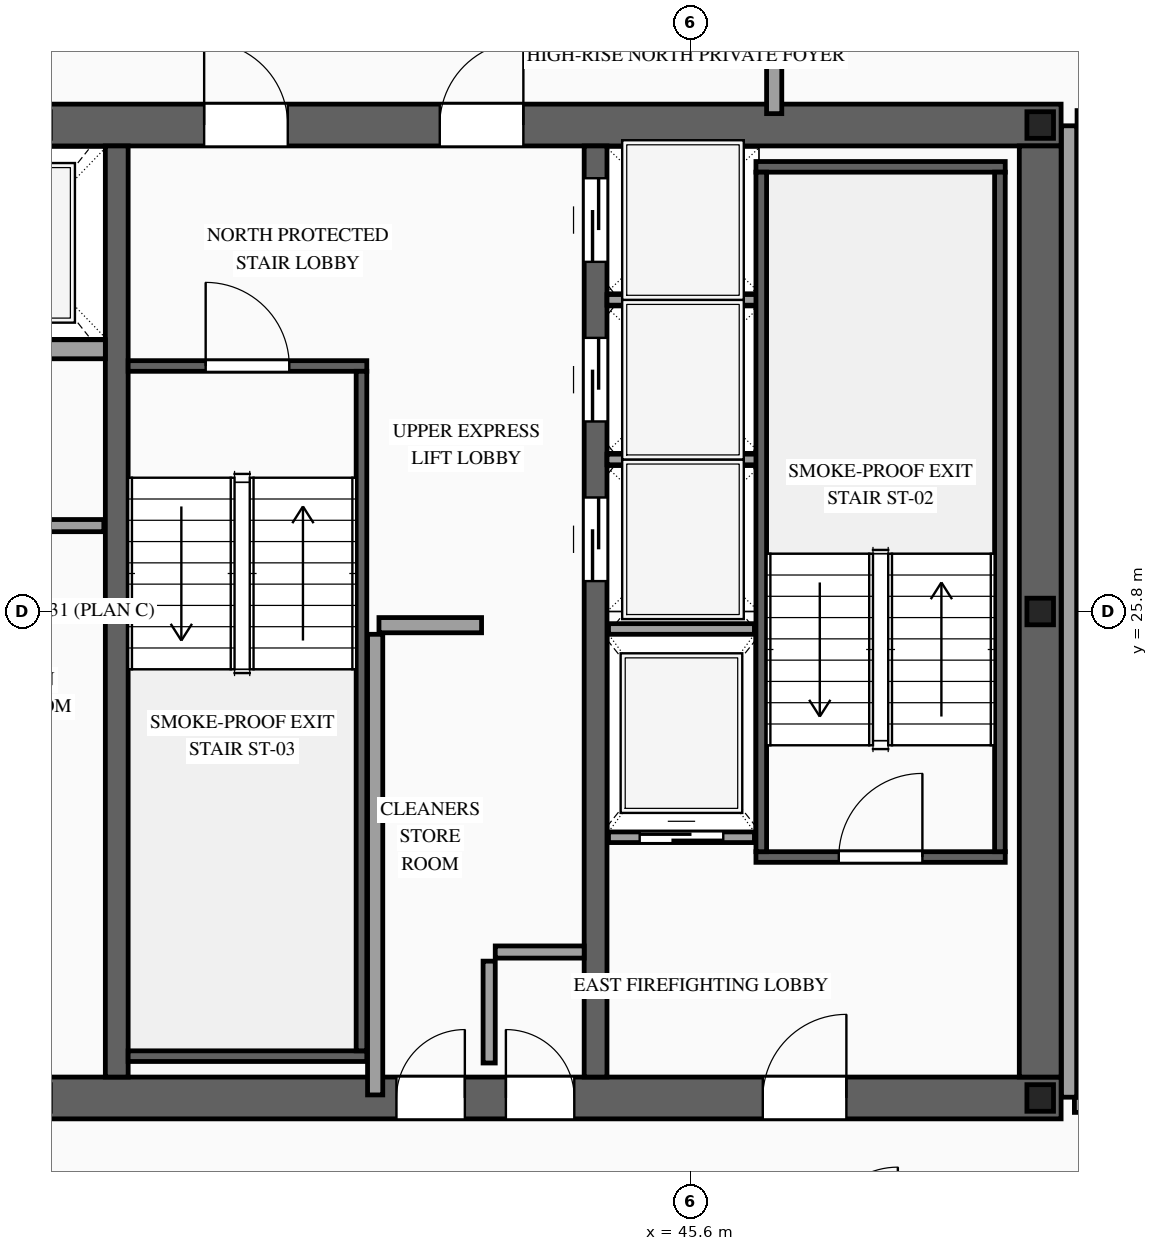
"""IFC4 building model, lengths in metres.
Left out: names, types, materials, properties, quantities, classifications, styles, units other than length and angle.
Written with IfcOpenShell. Run it as: python <this file> out.ifc"""

import sys

from ifc_helpers import new_model, si_unit, direction, frame, frame_2d, origin, origin_2d, place, context, subcontext, project, spatial, rectangle, i_section, extrude, source, transform, mapped, element, fill, save


model = new_model("IFC4")
c1 = context("Model", 3, precision=1e-05, world=origin(), true_north=direction((0.0, 1.0)))
c2 = subcontext(c1, "Body", "Model", "MODEL_VIEW")
j1 = project(units=[si_unit("LENGTHUNIT", "METRE"), si_unit("PLANEANGLEUNIT", "RADIAN")], contexts=[c1])
p1 = place(None, origin())
s1 = spatial("IfcSite", under=j1, at=p1, CompositionType="ELEMENT")
p2 = place(p1, origin())
s2 = spatial("IfcBuilding", under=s1, at=p2, CompositionType="ELEMENT")
p3 = place(p2, frame((0.0, 0.0, 282.1)))
s3 = spatial("IfcBuildingStorey", under=s2, at=p3, CompositionType="ELEMENT", Elevation=282.1)
p4 = place(p3, frame((23.525, 19.4, 0.0), z_axis=(0.0, 0.0, 1.0), x_axis=(1.0, 0.0, 0.0)))
e1 = element("IfcWall", 1, at=p4, inside=s3, PredefinedType="SHEAR", context=c2, shape_type="SweptSolid", body=[
    extrude(rectangle(XDim=26.95, YDim=0.55, at=frame_2d((13.475, 0.0))), origin(), (0.0, 0.0, 1.0), 3.5),
])
p5 = place(p4, frame((1.925, 0.0, 0.0)))
e2 = element("IfcOpeningElement", 2, at=p5, cuts=e1, PredefinedType="OPENING", context=c2, shape_type="SweptSolid", body=[
    extrude(rectangle(XDim=1.1, YDim=2.2, at=frame_2d((0.55, 1.1))), frame((0.0, 0.29, 0.0), z_axis=(0.0, -1.0, 0.0), x_axis=(1.0, 0.0, 0.0)), (0.0, 0.0, 1.0), 0.58),
])
p6 = place(p4, frame((9.825, 0.0, 0.0)))
e3 = element("IfcOpeningElement", 3, at=p6, cuts=e1, PredefinedType="OPENING", context=c2, shape_type="SweptSolid", body=[
    extrude(rectangle(XDim=1.1, YDim=2.2, at=frame_2d((0.55, 1.1))), frame((0.0, 0.29, 0.0), z_axis=(0.0, -1.0, 0.0), x_axis=(1.0, 0.0, 0.0)), (0.0, 0.0, 1.0), 0.58),
])
p7 = place(p4, frame((23.025, 0.0, 0.0)))
e4 = element("IfcOpeningElement", 4, at=p7, cuts=e1, PredefinedType="OPENING", context=c2, shape_type="SweptSolid", body=[
    extrude(rectangle(XDim=1.1, YDim=2.2, at=frame_2d((0.55, 1.1))), frame((0.0, 0.29, 0.0), z_axis=(0.0, -1.0, 0.0), x_axis=(1.0, 0.0, 0.0)), (0.0, 0.0, 1.0), 0.58),
])
p8 = place(p4, frame((19.645, 0.0, 0.0)))
e5 = element("IfcOpeningElement", 5, at=p8, cuts=e1, PredefinedType="OPENING", context=c2, shape_type="SweptSolid", body=[
    extrude(rectangle(XDim=0.9, YDim=2.15, at=frame_2d((0.45, 1.075))), frame((0.0, 0.29, 0.0), z_axis=(0.0, -1.0, 0.0), x_axis=(1.0, 0.0, 0.0)), (0.0, 0.0, 1.0), 0.58),
])
p9 = place(p4, frame((18.205, 0.0, 0.0)))
e6 = element("IfcOpeningElement", 6, at=p9, cuts=e1, PredefinedType="OPENING", context=c2, shape_type="SweptSolid", body=[
    extrude(rectangle(XDim=0.9, YDim=2.15, at=frame_2d((0.45, 1.075))), frame((0.0, 0.29, 0.0), z_axis=(0.0, -1.0, 0.0), x_axis=(1.0, 0.0, 0.0)), (0.0, 0.0, 1.0), 0.58),
])
p10 = place(p3, frame((23.525, 32.2, 0.0), z_axis=(0.0, 0.0, 1.0), x_axis=(1.0, 0.0, 0.0)))
e7 = element("IfcWall", 7, at=p10, inside=s3, PredefinedType="SHEAR", context=c2, shape_type="SweptSolid", body=[
    extrude(rectangle(XDim=26.95, YDim=0.55, at=frame_2d((13.475, 0.0))), origin(), (0.0, 0.0, 1.0), 3.5),
])
p11 = place(p10, frame((4.545, 0.0, 0.0)))
e8 = element("IfcOpeningElement", 8, at=p11, cuts=e7, PredefinedType="OPENING", context=c2, shape_type="SweptSolid", body=[
    extrude(rectangle(XDim=0.9, YDim=2.15, at=frame_2d((0.45, 1.075))), frame((0.0, 0.29, 0.0), z_axis=(0.0, -1.0, 0.0), x_axis=(1.0, 0.0, 0.0)), (0.0, 0.0, 1.0), 0.58),
])
p12 = place(p10, frame((9.825, 0.0, 0.0)))
e9 = element("IfcOpeningElement", 9, at=p12, cuts=e7, PredefinedType="OPENING", context=c2, shape_type="SweptSolid", body=[
    extrude(rectangle(XDim=1.1, YDim=2.2, at=frame_2d((0.55, 1.1))), frame((0.0, 0.29, 0.0), z_axis=(0.0, -1.0, 0.0), x_axis=(1.0, 0.0, 0.0)), (0.0, 0.0, 1.0), 0.58),
])
p13 = place(p10, frame((15.675, 0.0, 0.0)))
e10 = element("IfcOpeningElement", 10, at=p13, cuts=e7, PredefinedType="OPENING", context=c2, shape_type="SweptSolid", body=[
    extrude(rectangle(XDim=1.1, YDim=2.2, at=frame_2d((0.55, 1.1))), frame((0.0, 0.29, 0.0), z_axis=(0.0, -1.0, 0.0), x_axis=(1.0, 0.0, 0.0)), (0.0, 0.0, 1.0), 0.58),
])
p14 = place(p10, frame((18.775, 0.0, 0.0)))
e11 = element("IfcOpeningElement", 11, at=p14, cuts=e7, PredefinedType="OPENING", context=c2, shape_type="SweptSolid", body=[
    extrude(rectangle(XDim=1.1, YDim=2.2, at=frame_2d((0.55, 1.1))), frame((0.0, 0.29, 0.0), z_axis=(0.0, -1.0, 0.0), x_axis=(1.0, 0.0, 0.0)), (0.0, 0.0, 1.0), 0.58),
])
m1 = source(origin(), c2, "Body", "SweptSolid", [
    extrude(rectangle(XDim=12.25, YDim=0.55, at=frame_2d((6.125, 0.0))), origin(), (0.0, 0.0, 1.0), 3.5),
])
p15 = place(p3, frame((50.2, 19.675, 0.0), z_axis=(0.0, 0.0, 1.0), x_axis=(0.0, 1.0, 0.0)))
e12 = element("IfcWall", 12, at=p15, inside=s3, PredefinedType="SHEAR", context=c2, shape_type="MappedRepresentation", body=[
    mapped(m1, transform((0.0, 0.0, 0.0), scale=1.0)),
])
m2 = source(origin(), c2, "Body", "SweptSolid", [
    extrude(rectangle(XDim=12.25, YDim=0.3, at=frame_2d((6.125, 0.0))), origin(), (0.0, 0.0, 1.0), 3.5),
])
p16 = place(p3, frame((38.05, 19.675, 0.0), z_axis=(0.0, 0.0, 1.0), x_axis=(0.0, 1.0, 0.0)))
e13 = element("IfcWall", 13, at=p16, inside=s3, PredefinedType="SOLIDWALL", context=c2, shape_type="MappedRepresentation", body=[
    mapped(m2, transform((0.0, 0.0, 0.0), scale=1.0)),
])
p17 = place(p3, frame((44.35, 19.675, 0.0), z_axis=(0.0, 0.0, 1.0), x_axis=(0.0, 1.0, 0.0)))
e14 = element("IfcWall", 14, at=p17, inside=s3, PredefinedType="SOLIDWALL", context=c2, shape_type="SweptSolid", body=[
    extrude(rectangle(XDim=12.25, YDim=0.3, at=frame_2d((6.125, 0.0))), origin(), (0.0, 0.0, 1.0), 3.5),
])
p18 = place(p17, frame((6.525, 0.0, 0.0)))
e15 = element("IfcOpeningElement", 15, at=p18, cuts=e14, PredefinedType="OPENING", context=c2, shape_type="SweptSolid", body=[
    extrude(rectangle(XDim=1.1, YDim=2.2, at=frame_2d((0.55, 1.1))), frame((0.0, 0.165, 0.0), z_axis=(0.0, -1.0, 0.0), x_axis=(1.0, 0.0, 0.0)), (0.0, 0.0, 1.0), 0.33),
])
p19 = place(p17, frame((8.625, 0.0, 0.0)))
e16 = element("IfcOpeningElement", 16, at=p19, cuts=e14, PredefinedType="OPENING", context=c2, shape_type="SweptSolid", body=[
    extrude(rectangle(XDim=1.1, YDim=2.2, at=frame_2d((0.55, 1.1))), frame((0.0, 0.165, 0.0), z_axis=(0.0, -1.0, 0.0), x_axis=(1.0, 0.0, 0.0)), (0.0, 0.0, 1.0), 0.33),
])
p20 = place(p17, frame((10.725, 0.0, 0.0)))
e17 = element("IfcOpeningElement", 17, at=p20, cuts=e14, PredefinedType="OPENING", context=c2, shape_type="SweptSolid", body=[
    extrude(rectangle(XDim=1.1, YDim=2.2, at=frame_2d((0.55, 1.1))), frame((0.0, 0.165, 0.0), z_axis=(0.0, -1.0, 0.0), x_axis=(1.0, 0.0, 0.0)), (0.0, 0.0, 1.0), 0.33),
])
m3 = source(origin(), c2, "Body", "SweptSolid", [
    extrude(i_section(OverallWidth=0.35, OverallDepth=0.35, WebThickness=0.012, FlangeThickness=0.019, at=origin_2d()), origin(), (0.0, 0.0, 1.0), 3.5),
])
for number, where, z_axis, x_axis in (
    (18, (50.2, 19.4, 0.0), (0.0, 0.0, 1.0), (1.0, 0.0, 0.0)),
    (19, (50.2, 25.8, 0.0), (0.0, 0.0, 1.0), (1.0, 0.0, 0.0)),
    (20, (50.2, 32.2, 0.0), (0.0, 0.0, 1.0), (1.0, 0.0, 0.0)),
):
    element("IfcColumn", number, at=place(p3, frame(where, z_axis=z_axis, x_axis=x_axis)), inside=s3, PredefinedType="COLUMN", context=c2, shape_type="MappedRepresentation", body=[
        mapped(m3, transform((0.0, 0.0, 0.0), scale=1.0)),
    ])
p21 = place(p3, frame((44.52, 22.83, 0.0), z_axis=(0.0, 0.0, 1.0), x_axis=(1.0, 0.0, 0.0)))
e21 = element("IfcWall", 21, at=p21, inside=s3, PredefinedType="SOLIDWALL", context=c2, shape_type="SweptSolid", body=[
    extrude(rectangle(XDim=1.92, YDim=0.14, at=frame_2d((0.96, 0.0))), origin(), (0.0, 0.0, 1.0), 3.28),
])
p22 = place(p21, frame((0.41, 0.0, 0.0)))
e22 = element("IfcOpeningElement", 22, at=p22, cuts=e21, PredefinedType="OPENING", context=c2, shape_type="SweptSolid", body=[
    extrude(rectangle(XDim=1.1, YDim=2.2, at=frame_2d((0.55, 1.1))), frame((0.0, 0.085, 0.0), z_axis=(0.0, -1.0, 0.0), x_axis=(1.0, 0.0, 0.0)), (0.0, 0.0, 1.0), 0.17),
])
m4 = source(origin(), c2, "Body", "SweptSolid", [
    extrude(rectangle(XDim=1.92, YDim=0.14, at=frame_2d((0.96, 0.0))), origin(), (0.0, 0.0, 1.0), 3.28),
])
p23 = place(p3, frame((44.52, 25.57, 0.0), z_axis=(0.0, 0.0, 1.0), x_axis=(1.0, 0.0, 0.0)))
e23 = element("IfcWall", 23, at=p23, inside=s3, PredefinedType="SOLIDWALL", context=c2, shape_type="MappedRepresentation", body=[
    mapped(m4, transform((0.0, 0.0, 0.0), scale=1.0)),
])
m5 = source(origin(), c2, "Body", "SweptSolid", [
    extrude(rectangle(XDim=2.4, YDim=0.25, at=frame_2d((1.2, 0.0))), origin(), (0.0, 0.0, 1.0), 3.28),
])
p24 = place(p3, frame((35.5, 29.25, 0.0), z_axis=(0.0, 0.0, 1.0), x_axis=(1.0, 0.0, 0.0)))
e24 = element("IfcWall", 24, at=p24, inside=s3, PredefinedType="SOLIDWALL", context=c2, shape_type="MappedRepresentation", body=[
    mapped(m5, transform((0.0, 0.0, 0.0), scale=1.0)),
])
m6 = source(origin(), c2, "Body", "SweptSolid", [
    extrude(rectangle(XDim=2.0, YDim=0.14, at=frame_2d((1.0, 0.0))), origin(), (0.0, 0.0, 1.0), 3.28),
])
for number, where, z_axis, x_axis in (
    (25, (44.5, 27.8, 0.0), (0.0, 0.0, 1.0), (1.0, 0.0, 0.0)),
    (26, (44.5, 29.9, 0.0), (0.0, 0.0, 1.0), (1.0, 0.0, 0.0)),
):
    element("IfcWall", number, at=place(p3, frame(where, z_axis=z_axis, x_axis=x_axis)), inside=s3, PredefinedType="SOLIDWALL", context=c2, shape_type="MappedRepresentation", body=[
        mapped(m6, transform((0.0, 0.0, 0.0), scale=1.0)),
    ])
p25 = place(p3, frame((46.46, 22.57, 0.0), z_axis=(0.0, 0.0, 1.0), x_axis=(1.0, 0.0, 0.0)))
e27 = element("IfcWall", 27, at=p25, inside=s3, PredefinedType="SOLIDWALL", context=c2, shape_type="SweptSolid", body=[
    extrude(rectangle(XDim=3.28, YDim=0.14, at=frame_2d((1.64, 0.0))), origin(), (0.0, 0.0, 1.0), 3.28),
])
p26 = place(p25, frame((1.09, 0.0, 0.0)))
e28 = element("IfcOpeningElement", 28, at=p26, cuts=e27, PredefinedType="OPENING", context=c2, shape_type="SweptSolid", body=[
    extrude(rectangle(XDim=1.1, YDim=2.2, at=frame_2d((0.55, 1.1))), frame((0.0, 0.085, 0.0), z_axis=(0.0, -1.0, 0.0), x_axis=(1.0, 0.0, 0.0)), (0.0, 0.0, 1.0), 0.17),
])
m7 = source(origin(), c2, "Body", "SweptSolid", [
    extrude(rectangle(XDim=3.28, YDim=0.14, at=frame_2d((1.64, 0.0))), origin(), (0.0, 0.0, 1.0), 3.28),
])
p27 = place(p3, frame((46.46, 31.65, 0.0), z_axis=(0.0, 0.0, 1.0), x_axis=(1.0, 0.0, 0.0)))
e29 = element("IfcWall", 29, at=p27, inside=s3, PredefinedType="SOLIDWALL", context=c2, shape_type="MappedRepresentation", body=[
    mapped(m7, transform((0.0, 0.0, 0.0), scale=1.0)),
])
m8 = source(origin(), c2, "Body", "SweptSolid", [
    extrude(rectangle(XDim=8.94, YDim=0.14, at=frame_2d((4.47, 0.0))), origin(), (0.0, 0.0, 1.0), 3.28),
])
for number, where, z_axis, x_axis in (
    (30, (46.53, 22.64, 0.0), (0.0, 0.0, 1.0), (0.0, 1.0, 0.0)),
    (31, (49.67, 22.64, 0.0), (0.0, 0.0, 1.0), (0.0, 1.0, 0.0)),
):
    element("IfcWall", number, at=place(p3, frame(where, z_axis=z_axis, x_axis=x_axis)), inside=s3, PredefinedType="SOLIDWALL", context=c2, shape_type="MappedRepresentation", body=[
        mapped(m8, transform((0.0, 0.0, 0.0), scale=1.0)),
    ])
p28 = place(p3, frame((38.2, 29.03, 0.0), z_axis=(0.0, 0.0, 1.0), x_axis=(1.0, 0.0, 0.0)))
e32 = element("IfcWall", 32, at=p28, inside=s3, PredefinedType="SOLIDWALL", context=c2, shape_type="SweptSolid", body=[
    extrude(rectangle(XDim=3.14, YDim=0.14, at=frame_2d((1.57, 0.0))), origin(), (0.0, 0.0, 1.0), 3.28),
])
p29 = place(p28, frame((1.02, 0.0, 0.0)))
e33 = element("IfcOpeningElement", 33, at=p29, cuts=e32, PredefinedType="OPENING", context=c2, shape_type="SweptSolid", body=[
    extrude(rectangle(XDim=1.1, YDim=2.2, at=frame_2d((0.55, 1.1))), frame((0.0, 0.085, 0.0), z_axis=(0.0, -1.0, 0.0), x_axis=(1.0, 0.0, 0.0)), (0.0, 0.0, 1.0), 0.17),
])
m9 = source(origin(), c2, "Body", "SweptSolid", [
    extrude(rectangle(XDim=3.14, YDim=0.14, at=frame_2d((1.57, 0.0))), origin(), (0.0, 0.0, 1.0), 3.28),
])
p30 = place(p3, frame((38.2, 19.95, 0.0), z_axis=(0.0, 0.0, 1.0), x_axis=(1.0, 0.0, 0.0)))
e34 = element("IfcWall", 34, at=p30, inside=s3, PredefinedType="SOLIDWALL", context=c2, shape_type="MappedRepresentation", body=[
    mapped(m9, transform((0.0, 0.0, 0.0), scale=1.0)),
])
m10 = source(origin(), c2, "Body", "SweptSolid", [
    extrude(rectangle(XDim=8.94, YDim=0.14, at=frame_2d((4.47, 0.0))), origin(), (0.0, 0.0, 1.0), 3.28),
])
p31 = place(p3, frame((41.27, 20.02, 0.0), z_axis=(0.0, 0.0, 1.0), x_axis=(0.0, 1.0, 0.0)))
e35 = element("IfcWall", 35, at=p31, inside=s3, PredefinedType="SOLIDWALL", context=c2, shape_type="MappedRepresentation", body=[
    mapped(m10, transform((0.0, 0.0, 0.0), scale=1.0)),
])
m11 = source(origin(), c2, "Body", "SweptSolid", [
    extrude(rectangle(XDim=2.36, YDim=0.16, at=frame_2d((1.18, 0.0))), origin(), (0.0, 0.0, 1.0), 3.28),
])
p32 = place(p3, frame((35.52, 26.93, 0.0), z_axis=(0.0, 0.0, 1.0), x_axis=(1.0, 0.0, 0.0)))
e36 = element("IfcWall", 36, at=p32, inside=s3, PredefinedType="PARTITIONING", context=c2, shape_type="MappedRepresentation", body=[
    mapped(m11, transform((0.0, 0.0, 0.0), scale=1.0)),
])
m12 = source(origin(), c2, "Body", "SweptSolid", [
    extrude(rectangle(XDim=1.34, YDim=0.16, at=frame_2d((0.67, 0.0))), origin(), (0.0, 0.0, 1.0), 3.28),
])
p33 = place(p3, frame((42.95, 19.86, 0.0), z_axis=(0.0, 0.0, 1.0), x_axis=(0.0, 1.0, 0.0)))
e37 = element("IfcWall", 37, at=p33, inside=s3, PredefinedType="PARTITIONING", context=c2, shape_type="MappedRepresentation", body=[
    mapped(m12, transform((0.0, 0.0, 0.0), scale=1.0)),
])
m13 = source(origin(), c2, "Body", "SweptSolid", [
    extrude(rectangle(XDim=1.17, YDim=0.16, at=frame_2d((0.585, 0.0))), origin(), (0.0, 0.0, 1.0), 3.28),
])
p34 = place(p3, frame((43.03, 21.32, 0.0), z_axis=(0.0, 0.0, 1.0), x_axis=(1.0, 0.0, 0.0)))
e38 = element("IfcWall", 38, at=p34, inside=s3, PredefinedType="PARTITIONING", context=c2, shape_type="MappedRepresentation", body=[
    mapped(m13, transform((0.0, 0.0, 0.0), scale=1.0)),
])
m14 = source(origin(), c2, "Body", "SweptSolid", [
    extrude(rectangle(XDim=6.06, YDim=0.2, at=frame_2d((3.03, 0.0))), origin(), (0.0, 0.0, 1.0), 3.28),
])
p35 = place(p3, frame((41.45, 19.44, 0.0), z_axis=(0.0, 0.0, 1.0), x_axis=(0.0, 1.0, 0.0)))
e39 = element("IfcWall", 39, at=p35, inside=s3, PredefinedType="PARTITIONING", context=c2, shape_type="MappedRepresentation", body=[
    mapped(m14, transform((0.0, 0.0, 0.0), scale=1.0)),
])
m15 = source(origin(), c2, "Body", "SweptSolid", [
    extrude(rectangle(XDim=1.35, YDim=0.2, at=frame_2d((0.675, 0.0))), origin(), (0.0, 0.0, 1.0), 3.28),
])
p36 = place(p3, frame((41.5, 25.62, 0.0), z_axis=(0.0, 0.0, 1.0), x_axis=(1.0, 0.0, 0.0)))
e40 = element("IfcWall", 40, at=p36, inside=s3, PredefinedType="PARTITIONING", context=c2, shape_type="MappedRepresentation", body=[
    mapped(m15, transform((0.0, 0.0, 0.0), scale=1.0)),
])
m16 = source(origin(), c2, "Body", "SweptSolid", [
    extrude(rectangle(XDim=1.7, YDim=0.2, at=frame_2d((0.85, 0.0))), origin(), (0.0, 0.0, 1.0), 3.28),
])
p37 = place(p3, frame((46.7, 32.35, 0.0), z_axis=(0.0, 0.0, 1.0), x_axis=(0.0, 1.0, 0.0)))
e41 = element("IfcWall", 41, at=p37, inside=s3, PredefinedType="PARTITIONING", context=c2, shape_type="MappedRepresentation", body=[
    mapped(m16, transform((0.0, 0.0, 0.0), scale=1.0)),
])
p38 = place(p3, frame((50.65, 19.31, 0.0), z_axis=(0.0, 0.0, 1.0), x_axis=(1.0, 0.0, 0.0)))
e42 = element("IfcWall", 42, at=p38, inside=s3, PredefinedType="PARTITIONING", context=c2, shape_type="SweptSolid", body=[
    extrude(rectangle(XDim=6.8, YDim=0.2, at=frame_2d((3.4, 0.0))), origin(), (0.0, 0.0, 1.0), 3.28),
])
p39 = place(p38, frame((0.4, 0.0, 0.0)))
e43 = element("IfcOpeningElement", 43, at=p39, cuts=e42, PredefinedType="OPENING", context=c2, shape_type="SweptSolid", body=[
    extrude(rectangle(XDim=1.0, YDim=2.2, at=frame_2d((0.5, 1.1))), frame((0.0, 0.115, 0.0), z_axis=(0.0, -1.0, 0.0), x_axis=(1.0, 0.0, 0.0)), (0.0, 0.0, 1.0), 0.23),
])
m17 = source(origin(), c2, "Body", "SweptSolid", [
    extrude(rectangle(XDim=6.765, YDim=0.2, at=frame_2d((3.382, 0.0))), origin(), (0.0, 0.0, 1.0), 3.28),
])
p40 = place(p3, frame((50.685, 32.29, 0.0), z_axis=(0.0, 0.0, 1.0), x_axis=(1.0, 0.0, 0.0)))
e44 = element("IfcWall", 44, at=p40, inside=s3, PredefinedType="PARTITIONING", context=c2, shape_type="MappedRepresentation", body=[
    mapped(m17, transform((0.0, 0.0, 0.0), scale=1.0)),
])
m18 = source(origin(), c2, "Body", "SweptSolid", [
    extrude(rectangle(XDim=12.78, YDim=0.2, at=frame_2d((6.39, 0.0))), origin(), (0.0, 0.0, 1.0), 3.28),
])
p41 = place(p3, frame((50.58, 19.41, 0.0), z_axis=(0.0, 0.0, 1.0), x_axis=(0.0, 1.0, 0.0)))
e45 = element("IfcWall", 45, at=p41, inside=s3, PredefinedType="PARTITIONING", context=c2, shape_type="MappedRepresentation", body=[
    mapped(m18, transform((0.0, 0.0, 0.0), scale=1.0)),
])
m19 = source(origin(), c2, "Body", "SweptSolid", [
    extrude(rectangle(XDim=1.1, YDim=2.2, at=frame_2d((0.55, 1.1))), frame((0.0, 0.025, 0.0), z_axis=(0.0, -1.0, 0.0), x_axis=(1.0, 0.0, 0.0)), (0.0, 0.0, 1.0), 0.05),
])
p42 = place(p22, origin())
e46 = element("IfcDoor", 46, at=p42, inside=s3, OperationType="SLIDING_TO_RIGHT", PredefinedType="DOOR", context=c2, shape_type="MappedRepresentation", body=[
    mapped(m19, transform((0.0, 0.0, 0.0), scale=1.0)),
])
fill(e22, e46)
p43 = place(p18, origin())
e47 = element("IfcDoor", 47, at=p43, inside=s3, OperationType="SLIDING_TO_LEFT", PredefinedType="DOOR", context=c2, shape_type="MappedRepresentation", body=[
    mapped(m19, transform((0.0, 0.0, 0.0), scale=1.0)),
])
fill(e15, e47)
p44 = place(p19, origin())
e48 = element("IfcDoor", 48, at=p44, inside=s3, OperationType="SLIDING_TO_RIGHT", PredefinedType="DOOR", context=c2, shape_type="MappedRepresentation", body=[
    mapped(m19, transform((0.0, 0.0, 0.0), scale=1.0)),
])
fill(e16, e48)
p45 = place(p20, origin())
e49 = element("IfcDoor", 49, at=p45, inside=s3, OperationType="SLIDING_TO_LEFT", PredefinedType="DOOR", context=c2, shape_type="MappedRepresentation", body=[
    mapped(m19, transform((0.0, 0.0, 0.0), scale=1.0)),
])
fill(e17, e49)
m20 = source(origin(), c2, "Body", "SweptSolid", [
    extrude(rectangle(XDim=1.1, YDim=2.2, at=frame_2d((0.55, 1.1))), frame((0.0, 0.025, 0.0), z_axis=(0.0, -1.0, 0.0), x_axis=(1.0, 0.0, 0.0)), (0.0, 0.0, 1.0), 0.05),
])
p46 = place(p26, origin())
e50 = element("IfcDoor", 50, at=p46, inside=s3, OperationType="SINGLE_SWING_RIGHT", PredefinedType="DOOR", context=c2, shape_type="MappedRepresentation", body=[
    mapped(m20, transform((0.0, 0.0, 0.0), scale=1.0)),
])
fill(e28, e50)
p47 = place(p29, origin())
e51 = element("IfcDoor", 51, at=p47, inside=s3, OperationType="SINGLE_SWING_LEFT", PredefinedType="DOOR", context=c2, shape_type="MappedRepresentation", body=[
    mapped(m20, transform((0.0, 0.0, 0.0), scale=1.0)),
])
fill(e33, e51)
p48 = place(p7, origin())
e52 = element("IfcDoor", 52, at=p48, inside=s3, OperationType="SINGLE_SWING_RIGHT", PredefinedType="DOOR", context=c2, shape_type="MappedRepresentation", body=[
    mapped(m20, transform((0.0, 0.0, 0.0), scale=1.0)),
])
fill(e4, e52)
p49 = place(p13, origin())
e53 = element("IfcDoor", 53, at=p49, inside=s3, OperationType="SINGLE_SWING_LEFT", PredefinedType="DOOR", context=c2, shape_type="MappedRepresentation", body=[
    mapped(m20, transform((0.0, 0.0, 0.0), scale=1.0)),
])
fill(e10, e53)
p50 = place(p14, origin())
e54 = element("IfcDoor", 54, at=p50, inside=s3, OperationType="SINGLE_SWING_RIGHT", PredefinedType="DOOR", context=c2, shape_type="MappedRepresentation", body=[
    mapped(m20, transform((0.0, 0.0, 0.0), scale=1.0)),
])
fill(e11, e54)
m21 = source(origin(), c2, "Body", "SweptSolid", [
    extrude(rectangle(XDim=0.9, YDim=2.15, at=frame_2d((0.45, 1.075))), frame((0.0, 0.025, 0.0), z_axis=(0.0, -1.0, 0.0), x_axis=(1.0, 0.0, 0.0)), (0.0, 0.0, 1.0), 0.05),
])
p51 = place(p8, origin())
e55 = element("IfcDoor", 55, at=p51, inside=s3, OperationType="SINGLE_SWING_LEFT", PredefinedType="DOOR", context=c2, shape_type="MappedRepresentation", body=[
    mapped(m21, transform((0.0, 0.0, 0.0), scale=1.0)),
])
fill(e5, e55)
p52 = place(p9, origin())
e56 = element("IfcDoor", 56, at=p52, inside=s3, OperationType="SINGLE_SWING_RIGHT", PredefinedType="DOOR", context=c2, shape_type="MappedRepresentation", body=[
    mapped(m21, transform((0.0, 0.0, 0.0), scale=1.0)),
])
fill(e6, e56)
save(model, sys.argv[1])
